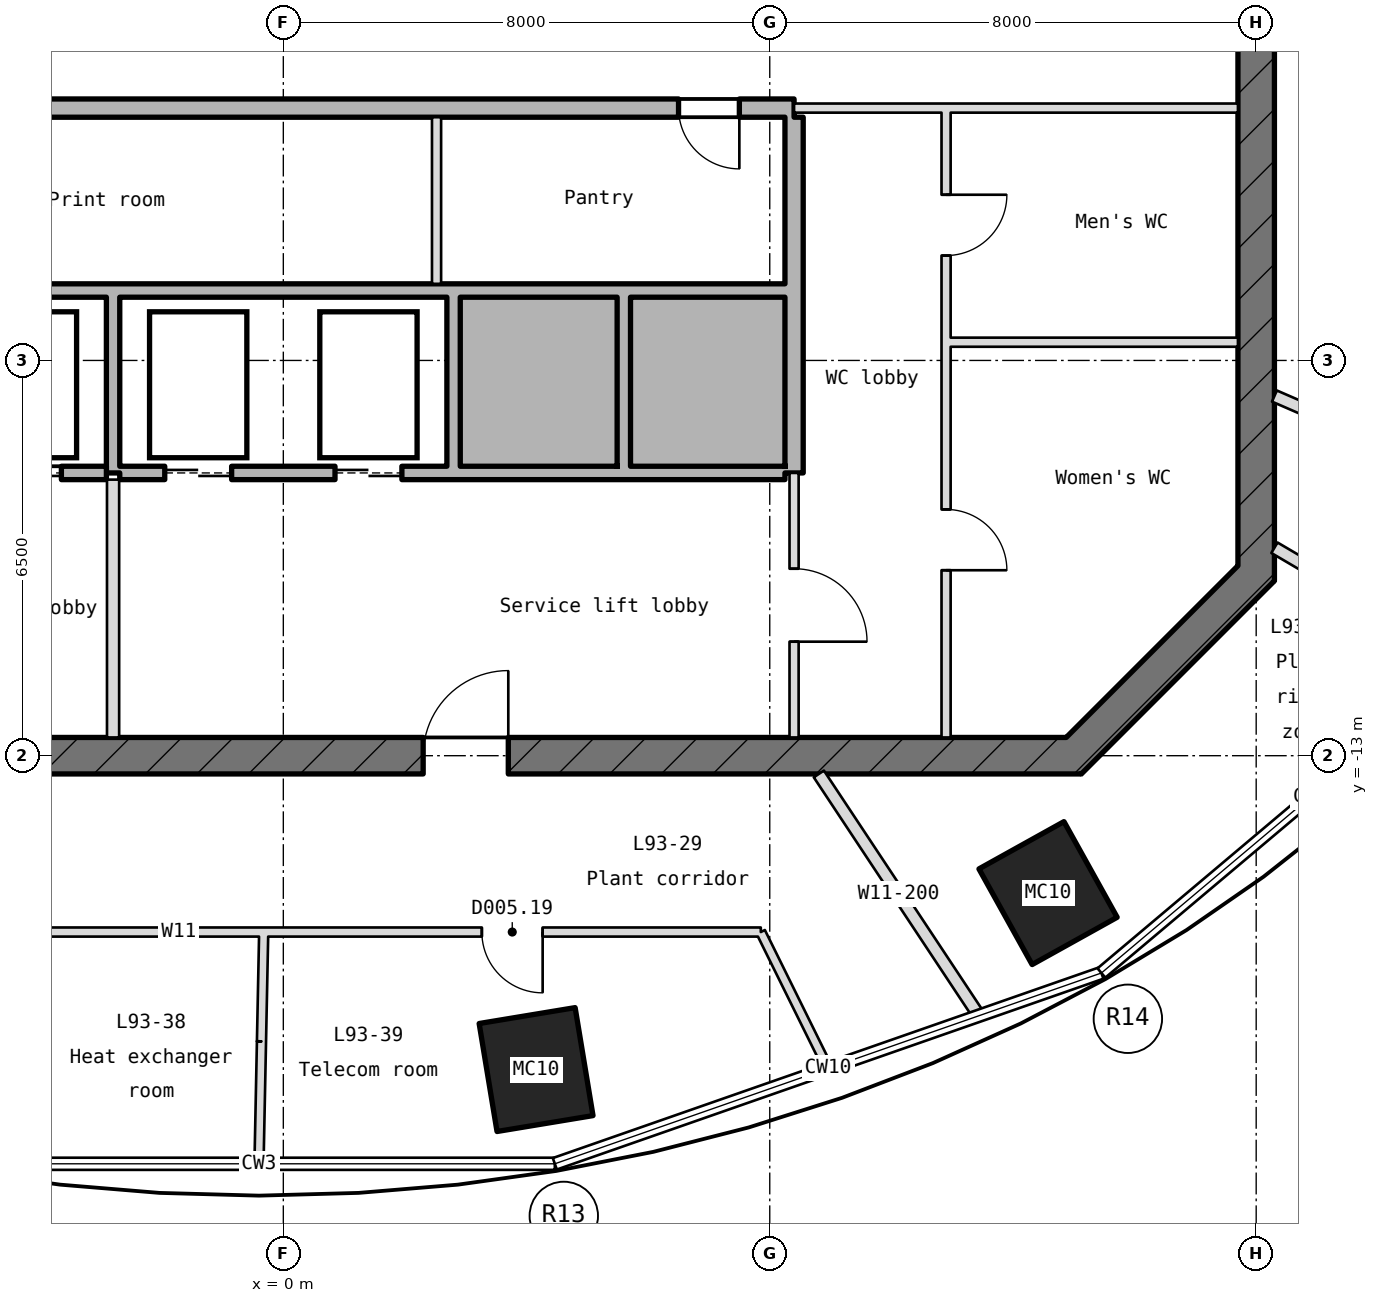
"""IFC4 building model, lengths in metres.
Left out: names, types, materials, properties, quantities, classifications, styles, units other than length and angle.
Written with IfcOpenShell. Run it as: python <this file> out.ifc"""

import sys

from ifc_helpers import new_model, si_unit, direction, frame, frame_2d, origin, origin_2d, place, context, subcontext, project, spatial, rectangle, hollow_rectangle, extrude, element, fill, save


model = new_model("IFC4")
c1 = context("Model", 3, precision=1e-05, world=origin(), true_north=direction((0.0, 1.0)))
c2 = subcontext(c1, "Body", "Model", "MODEL_VIEW")
j1 = project(units=[si_unit("LENGTHUNIT", "METRE"), si_unit("PLANEANGLEUNIT", "RADIAN")], contexts=[c1])
p1 = place(None, origin())
s1 = spatial("IfcSite", under=j1, at=p1, CompositionType="ELEMENT")
p2 = place(p1, origin())
s2 = spatial("IfcBuilding", under=s1, at=p2, CompositionType="ELEMENT")
p3 = place(p2, frame((0.0, 0.0, 413.55)))
s3 = spatial("IfcBuildingStorey", under=s2, at=p3, CompositionType="ELEMENT", Elevation=413.55)
for number, where, z_axis, x_axis in (
    (1, (4.157, -18.162, -0.2), (0.0, 0.0, 1.0), (-0.987, -0.163, 0.0)),
    (2, (12.577, -15.26, -0.2), (0.0, 0.0, 1.0), (-0.874, -0.486, 0.0)),
):
    element("IfcColumn", number, at=place(p3, frame(where, z_axis=z_axis, x_axis=x_axis)), inside=s3, PredefinedType="COLUMN", context=c2, shape_type="SweptSolid", body=[
        extrude(hollow_rectangle(XDim=1.6, YDim=1.8, WallThickness=0.045, at=origin_2d()), origin(), (0.0, 0.0, 1.0), 5.0),
    ])
p4 = place(p3, frame((12.912, -13.088, -0.2), z_axis=(0.0, 0.0, 1.0), x_axis=(0.707106781187, 0.707106781187, 0.0)))
e3 = element("IfcWall", 3, at=p4, inside=s3, PredefinedType="SHEAR", context=c2, shape_type="SweptSolid", body=[
    extrude(rectangle(XDim=4.491, YDim=0.6, at=frame_2d((2.246, 0.0))), origin(), (0.0, 0.0, 1.0), 5.0),
])
p5 = place(p3, frame((16.0, -10.124, -0.2), z_axis=(0.0, 0.0, 1.0), x_axis=(0.0, 1.0, 0.0)))
e4 = element("IfcWall", 4, at=p5, inside=s3, PredefinedType="SHEAR", context=c2, shape_type="SweptSolid", body=[
    extrude(rectangle(XDim=20.249, YDim=0.6, at=frame_2d((10.124, 0.0))), origin(), (0.0, 0.0, 1.0), 5.0),
])
p6 = place(p5, frame((8.924, 0.0, 0.2)))
e5 = element("IfcOpeningElement", 5, at=p6, cuts=e4, PredefinedType="OPENING", context=c2, shape_type="SweptSolid", body=[
    extrude(rectangle(XDim=2.4, YDim=2.1, at=frame_2d((1.2, 1.05))), frame((0.0, 0.31, 0.0), z_axis=(0.0, -1.0, 0.0), x_axis=(1.0, 0.0, 0.0)), (0.0, 0.0, 1.0), 0.62),
])
p7 = place(p5, frame((13.524, 0.0, 0.2)))
e6 = element("IfcOpeningElement", 6, at=p7, cuts=e4, PredefinedType="OPENING", context=c2, shape_type="SweptSolid", body=[
    extrude(rectangle(XDim=1.2, YDim=2.1, at=frame_2d((0.6, 1.05))), frame((0.0, 0.31, 0.0), z_axis=(0.0, -1.0, 0.0), x_axis=(1.0, 0.0, 0.0)), (0.0, 0.0, 1.0), 0.62),
])
p8 = place(p3, frame((-13.124, -13.0, -0.2), z_axis=(0.0, 0.0, 1.0), x_axis=(1.0, 0.0, 0.0)))
e7 = element("IfcWall", 7, at=p8, inside=s3, PredefinedType="SHEAR", context=c2, shape_type="SweptSolid", body=[
    extrude(rectangle(XDim=26.249, YDim=0.6, at=frame_2d((13.124, 0.0))), origin(), (0.0, 0.0, 1.0), 5.0),
])
p9 = place(p8, frame((2.824, 0.0, 0.2)))
e8 = element("IfcOpeningElement", 8, at=p9, cuts=e7, PredefinedType="OPENING", context=c2, shape_type="SweptSolid", body=[
    extrude(rectangle(XDim=1.2, YDim=2.1, at=frame_2d((0.6, 1.05))), frame((0.0, 0.31, 0.0), z_axis=(0.0, -1.0, 0.0), x_axis=(1.0, 0.0, 0.0)), (0.0, 0.0, 1.0), 0.62),
])
p10 = place(p8, frame((6.824, 0.0, 0.2)))
e9 = element("IfcOpeningElement", 9, at=p10, cuts=e7, PredefinedType="OPENING", context=c2, shape_type="SweptSolid", body=[
    extrude(rectangle(XDim=1.4, YDim=2.1, at=frame_2d((0.7, 1.05))), frame((0.0, 0.31, 0.0), z_axis=(0.0, -1.0, 0.0), x_axis=(1.0, 0.0, 0.0)), (0.0, 0.0, 1.0), 0.62),
])
p11 = place(p8, frame((15.424, 0.0, 0.2)))
e10 = element("IfcOpeningElement", 10, at=p11, cuts=e7, PredefinedType="OPENING", context=c2, shape_type="SweptSolid", body=[
    extrude(rectangle(XDim=1.4, YDim=2.1, at=frame_2d((0.7, 1.05))), frame((0.0, 0.31, 0.0), z_axis=(0.0, -1.0, 0.0), x_axis=(1.0, 0.0, 0.0)), (0.0, 0.0, 1.0), 0.62),
])
p12 = place(p3, frame((-8.25, -8.35, 0.0), z_axis=(0.0, 0.0, 1.0), x_axis=(1.0, 0.0, 0.0)))
e11 = element("IfcWall", 11, at=p12, inside=s3, PredefinedType="STANDARD", context=c2, shape_type="SweptSolid", body=[
    extrude(rectangle(XDim=5.34, YDim=0.22, at=frame_2d((2.67, 0.0))), origin(), (0.0, 0.0, 1.0), 4.8),
])
p13 = place(p12, frame((0.7, 0.0, 0.0)))
e12 = element("IfcOpeningElement", 12, at=p13, cuts=e11, PredefinedType="OPENING", context=c2, shape_type="SweptSolid", body=[
    extrude(rectangle(XDim=1.1, YDim=2.1, at=frame_2d((0.55, 1.05))), frame((0.0, 0.12, 0.0), z_axis=(0.0, -1.0, 0.0), x_axis=(1.0, 0.0, 0.0)), (0.0, 0.0, 1.0), 0.24),
])
p14 = place(p12, frame((3.5, 0.0, 0.0)))
e13 = element("IfcOpeningElement", 13, at=p14, cuts=e11, PredefinedType="OPENING", context=c2, shape_type="SweptSolid", body=[
    extrude(rectangle(XDim=1.1, YDim=2.1, at=frame_2d((0.55, 1.05))), frame((0.0, 0.12, 0.0), z_axis=(0.0, -1.0, 0.0), x_axis=(1.0, 0.0, 0.0)), (0.0, 0.0, 1.0), 0.24),
])
p15 = place(p3, frame((-2.69, -8.35, 0.0), z_axis=(0.0, 0.0, 1.0), x_axis=(1.0, 0.0, 0.0)))
e14 = element("IfcWall", 14, at=p15, inside=s3, PredefinedType="STANDARD", context=c2, shape_type="SweptSolid", body=[
    extrude(rectangle(XDim=10.94, YDim=0.22, at=frame_2d((5.47, 0.0))), origin(), (0.0, 0.0, 1.0), 4.8),
])
p16 = place(p15, frame((0.74, 0.0, 0.0)))
e15 = element("IfcOpeningElement", 15, at=p16, cuts=e14, PredefinedType="OPENING", context=c2, shape_type="SweptSolid", body=[
    extrude(rectangle(XDim=1.1, YDim=2.1, at=frame_2d((0.55, 1.05))), frame((0.0, 0.12, 0.0), z_axis=(0.0, -1.0, 0.0), x_axis=(1.0, 0.0, 0.0)), (0.0, 0.0, 1.0), 0.24),
])
p17 = place(p15, frame((3.54, 0.0, 0.0)))
e16 = element("IfcOpeningElement", 16, at=p17, cuts=e14, PredefinedType="OPENING", context=c2, shape_type="SweptSolid", body=[
    extrude(rectangle(XDim=1.1, YDim=2.1, at=frame_2d((0.55, 1.05))), frame((0.0, 0.12, 0.0), z_axis=(0.0, -1.0, 0.0), x_axis=(1.0, 0.0, 0.0)), (0.0, 0.0, 1.0), 0.24),
])
p18 = place(p3, frame((10.975, -6.2, 0.0), z_axis=(0.0, 0.0, 1.0), x_axis=(1.0, 0.0, 0.0)))
e17 = element("IfcWall", 17, at=p18, inside=s3, PredefinedType="PARTITIONING", context=c2, shape_type="SweptSolid", body=[
    extrude(rectangle(XDim=4.725, YDim=0.15, at=frame_2d((2.362, 0.0))), origin(), (0.0, 0.0, 1.0), 4.8),
])
p19 = place(p3, frame((-8.25, -5.35, 0.0), z_axis=(0.0, 0.0, 1.0), x_axis=(1.0, 0.0, 0.0)))
e18 = element("IfcWall", 18, at=p19, inside=s3, PredefinedType="STANDARD", context=c2, shape_type="SweptSolid", body=[
    extrude(rectangle(XDim=16.5, YDim=0.22, at=frame_2d((8.25, 0.0))), origin(), (0.0, 0.0, 1.0), 4.8),
])
p20 = place(p3, frame((-8.4, -2.35, -0.2), z_axis=(0.0, 0.0, 1.0), x_axis=(1.0, 0.0, 0.0)))
e19 = element("IfcWall", 19, at=p20, inside=s3, PredefinedType="SHEAR", context=c2, shape_type="SweptSolid", body=[
    extrude(rectangle(XDim=16.8, YDim=0.3, at=frame_2d((8.4, 0.0))), origin(), (0.0, 0.0, 1.0), 5.0),
])
p21 = place(p20, frame((0.9, 0.0, 0.2)))
e20 = element("IfcOpeningElement", 20, at=p21, cuts=e19, PredefinedType="OPENING", context=c2, shape_type="SweptSolid", body=[
    extrude(rectangle(XDim=1.0, YDim=2.1, at=frame_2d((0.5, 1.05))), frame((0.0, 0.16, 0.0), z_axis=(0.0, -1.0, 0.0), x_axis=(1.0, 0.0, 0.0)), (0.0, 0.0, 1.0), 0.32),
])
p22 = place(p20, frame((14.9, 0.0, 0.2)))
e21 = element("IfcOpeningElement", 21, at=p22, cuts=e19, PredefinedType="OPENING", context=c2, shape_type="SweptSolid", body=[
    extrude(rectangle(XDim=1.0, YDim=2.1, at=frame_2d((0.5, 1.05))), frame((0.0, 0.16, 0.0), z_axis=(0.0, -1.0, 0.0), x_axis=(1.0, 0.0, 0.0)), (0.0, 0.0, 1.0), 0.32),
])
p23 = place(p3, frame((8.4, -2.35, 0.0), z_axis=(0.0, 0.0, 1.0), x_axis=(1.0, 0.0, 0.0)))
e22 = element("IfcWall", 22, at=p23, inside=s3, PredefinedType="PARTITIONING", context=c2, shape_type="SweptSolid", body=[
    extrude(rectangle(XDim=7.3, YDim=0.15, at=frame_2d((3.65, 0.0))), origin(), (0.0, 0.0, 1.0), 4.8),
])
p24 = place(p3, frame((-2.8, -12.7, 0.0), z_axis=(0.0, 0.0, 1.0), x_axis=(0.0, 1.0, 0.0)))
e23 = element("IfcWall", 23, at=p24, inside=s3, PredefinedType="PARTITIONING", context=c2, shape_type="SweptSolid", body=[
    extrude(rectangle(XDim=4.24, YDim=0.2, at=frame_2d((2.12, 0.0))), origin(), (0.0, 0.0, 1.0), 4.8),
])
p25 = place(p3, frame((-2.8, -8.35, 0.0), z_axis=(0.0, 0.0, 1.0), x_axis=(0.0, 1.0, 0.0)))
e24 = element("IfcWall", 24, at=p25, inside=s3, PredefinedType="STANDARD", context=c2, shape_type="SweptSolid", body=[
    extrude(rectangle(XDim=2.89, YDim=0.22, at=frame_2d((1.445, 0.0))), origin(), (0.0, 0.0, 1.0), 4.8),
])
p26 = place(p3, frame((2.52, -5.24, 0.0), z_axis=(0.0, 0.0, 1.0), x_axis=(0.0, 1.0, 0.0)))
e25 = element("IfcWall", 25, at=p26, inside=s3, PredefinedType="PARTITIONING", context=c2, shape_type="SweptSolid", body=[
    extrude(rectangle(XDim=2.74, YDim=0.15, at=frame_2d((1.37, 0.0))), origin(), (0.0, 0.0, 1.0), 4.8),
])
for number, where, z_axis, x_axis in (
    (26, (2.8, -8.24, 0.0), (0.0, 0.0, 1.0), (0.0, 1.0, 0.0)),
    (27, (5.6, -8.24, 0.0), (0.0, 0.0, 1.0), (0.0, 1.0, 0.0)),
):
    element("IfcWall", number, at=place(p3, frame(where, z_axis=z_axis, x_axis=x_axis)), inside=s3, PredefinedType="STANDARD", context=c2, shape_type="SweptSolid", body=[
        extrude(rectangle(XDim=2.78, YDim=0.22, at=frame_2d((1.39, 0.0))), origin(), (0.0, 0.0, 1.0), 4.8),
    ])
p27 = place(p3, frame((8.4, -12.7, 0.0), z_axis=(0.0, 0.0, 1.0), x_axis=(0.0, 1.0, 0.0)))
e28 = element("IfcWall", 28, at=p27, inside=s3, PredefinedType="PARTITIONING", context=c2, shape_type="SweptSolid", body=[
    extrude(rectangle(XDim=4.35, YDim=0.15, at=frame_2d((2.175, 0.0))), origin(), (0.0, 0.0, 1.0), 4.8),
])
p28 = place(p27, frame((1.575, 0.0, 0.0)))
e29 = element("IfcOpeningElement", 29, at=p28, cuts=e28, PredefinedType="OPENING", context=c2, shape_type="SweptSolid", body=[
    extrude(rectangle(XDim=1.2, YDim=2.1, at=frame_2d((0.6, 1.05))), frame((0.0, 0.085, 0.0), z_axis=(0.0, -1.0, 0.0), x_axis=(1.0, 0.0, 0.0)), (0.0, 0.0, 1.0), 0.17),
])
p29 = place(p3, frame((8.4, -8.35, -0.2), z_axis=(0.0, 0.0, 1.0), x_axis=(0.0, 1.0, 0.0)))
e30 = element("IfcWall", 30, at=p29, inside=s3, PredefinedType="SHEAR", context=c2, shape_type="SweptSolid", body=[
    extrude(rectangle(XDim=5.85, YDim=0.3, at=frame_2d((2.925, 0.0))), origin(), (0.0, 0.0, 1.0), 5.0),
])
p30 = place(p3, frame((10.9, -12.7, 0.0), z_axis=(0.0, 0.0, 1.0), x_axis=(0.0, 1.0, 0.0)))
e31 = element("IfcWall", 31, at=p30, inside=s3, PredefinedType="PARTITIONING", context=c2, shape_type="SweptSolid", body=[
    extrude(rectangle(XDim=10.275, YDim=0.15, at=frame_2d((5.137, 0.0))), origin(), (0.0, 0.0, 1.0), 4.8),
])
p31 = place(p30, frame((7.925, 0.0, 0.0)))
e32 = element("IfcOpeningElement", 32, at=p31, cuts=e31, PredefinedType="OPENING", context=c2, shape_type="SweptSolid", body=[
    extrude(rectangle(XDim=1.0, YDim=2.1, at=frame_2d((0.5, 1.05))), frame((0.0, 0.085, 0.0), z_axis=(0.0, -1.0, 0.0), x_axis=(1.0, 0.0, 0.0)), (0.0, 0.0, 1.0), 0.17),
])
p32 = place(p30, frame((2.75, 0.0, 0.0)))
e33 = element("IfcOpeningElement", 33, at=p32, cuts=e31, PredefinedType="OPENING", context=c2, shape_type="SweptSolid", body=[
    extrude(rectangle(XDim=1.0, YDim=2.1, at=frame_2d((0.5, 1.05))), frame((0.0, 0.085, 0.0), z_axis=(0.0, -1.0, 0.0), x_axis=(1.0, 0.0, 0.0)), (0.0, 0.0, 1.0), 0.17),
])
p33 = place(p3, frame((-11.288, -15.9, 0.0), z_axis=(0.0, 0.0, 1.0), x_axis=(1.0, 0.0, 0.0)))
e34 = element("IfcWall", 34, at=p33, inside=s3, PredefinedType="PARTITIONING", context=c2, shape_type="SweptSolid", body=[
    extrude(rectangle(XDim=19.141, YDim=0.15, at=frame_2d((9.57, 0.0))), origin(), (0.0, 0.0, 1.0), 4.8),
])
p34 = place(p33, frame((4.98, 0.0, 0.0)))
e35 = element("IfcOpeningElement", 35, at=p34, cuts=e34, PredefinedType="OPENING", context=c2, shape_type="SweptSolid", body=[
    extrude(rectangle(XDim=1.0, YDim=2.1, at=frame_2d((0.5, 1.05))), frame((0.0, 0.085, 0.0), z_axis=(0.0, -1.0, 0.0), x_axis=(1.0, 0.0, 0.0)), (0.0, 0.0, 1.0), 0.17),
])
p35 = place(p33, frame((14.553, 0.0, 0.0)))
e36 = element("IfcOpeningElement", 36, at=p35, cuts=e34, PredefinedType="OPENING", context=c2, shape_type="SweptSolid", body=[
    extrude(rectangle(XDim=1.0, YDim=2.1, at=frame_2d((0.5, 1.05))), frame((0.0, 0.085, 0.0), z_axis=(0.0, -1.0, 0.0), x_axis=(1.0, 0.0, 0.0)), (0.0, 0.0, 1.0), 0.17),
])
p36 = place(p3, frame((-0.4, -19.691, 0.0), z_axis=(0.0, 0.0, 1.0), x_axis=(0.020323991195, 0.999793446359, 0.0)))
e37 = element("IfcWall", 37, at=p36, inside=s3, PredefinedType="PARTITIONING", context=c2, shape_type="SweptSolid", body=[
    extrude(rectangle(XDim=1.994, YDim=0.15, at=frame_2d((0.997, 0.0))), origin(), (0.0, 0.0, 1.0), 4.8),
])
p37 = place(p3, frame((-0.359, -17.698, 0.0), z_axis=(0.0, 0.0, 1.0), x_axis=(0.020232174519, 0.999795308608, 0.0)))
e38 = element("IfcWall", 38, at=p37, inside=s3, PredefinedType="PARTITIONING", context=c2, shape_type="SweptSolid", body=[
    extrude(rectangle(XDim=1.798, YDim=0.15, at=frame_2d((0.899, 0.0))), origin(), (0.0, 0.0, 1.0), 4.49),
])
p38 = place(p3, frame((8.951, -18.124, 0.0), z_axis=(0.0, 0.0, 1.0), x_axis=(-0.44283891536, 0.896601190632, 0.0)))
e39 = element("IfcWall", 39, at=p38, inside=s3, PredefinedType="PARTITIONING", context=c2, shape_type="SweptSolid", body=[
    extrude(rectangle(XDim=2.481, YDim=0.15, at=frame_2d((1.24, 0.0))), origin(), (0.0, 0.0, 1.0), 4.8),
])
p39 = place(p3, frame((11.429, -17.259, 0.0), z_axis=(0.0, 0.0, 1.0), x_axis=(-0.55212294176, 0.833762710357, 0.0)))
e40 = element("IfcWall", 40, at=p39, inside=s3, PredefinedType="PARTITIONING", context=c2, shape_type="SweptSolid", body=[
    extrude(rectangle(XDim=4.749, YDim=0.2, at=frame_2d((2.374, 0.0))), origin(), (0.0, 0.0, 1.0), 4.8),
])
p40 = place(p3, frame((18.899, -11.107, 0.0), z_axis=(0.0, 0.0, 1.0), x_axis=(-0.862138181782, 0.506673223601, 0.0)))
e41 = element("IfcWall", 41, at=p40, inside=s3, PredefinedType="PARTITIONING", context=c2, shape_type="SweptSolid", body=[
    extrude(rectangle(XDim=3.014, YDim=0.2, at=frame_2d((1.507, 0.0))), origin(), (0.0, 0.0, 1.0), 4.8),
])
p41 = place(p3, frame((18.9, -8.216, 0.0), z_axis=(0.0, 0.0, 1.0), x_axis=(-0.917070056253, 0.398726111414, 0.0)))
e42 = element("IfcWall", 42, at=p41, inside=s3, PredefinedType="PARTITIONING", context=c2, shape_type="SweptSolid", body=[
    extrude(rectangle(XDim=2.835, YDim=0.2, at=frame_2d((1.417, 0.0))), origin(), (0.0, 0.0, 1.0), 4.8),
])
p42 = place(p14, origin())
e43 = element("IfcDoor", 43, at=p42, inside=s3, OperationType="DOUBLE_DOOR_SLIDING", PredefinedType="DOOR", context=c2, shape_type="SweptSolid", body=[
    extrude(rectangle(XDim=1.1, YDim=2.1, at=frame_2d((0.55, 1.05))), frame((0.0, 0.025, 0.0), z_axis=(0.0, -1.0, 0.0), x_axis=(1.0, 0.0, 0.0)), (0.0, 0.0, 1.0), 0.05),
])
fill(e13, e43)
p43 = place(p16, origin())
e44 = element("IfcDoor", 44, at=p43, inside=s3, OperationType="DOUBLE_DOOR_SLIDING", PredefinedType="DOOR", context=c2, shape_type="SweptSolid", body=[
    extrude(rectangle(XDim=1.1, YDim=2.1, at=frame_2d((0.55, 1.05))), frame((0.0, 0.025, 0.0), z_axis=(0.0, -1.0, 0.0), x_axis=(1.0, 0.0, 0.0)), (0.0, 0.0, 1.0), 0.05),
])
fill(e15, e44)
p44 = place(p17, origin())
e45 = element("IfcDoor", 45, at=p44, inside=s3, OperationType="DOUBLE_DOOR_SLIDING", PredefinedType="DOOR", context=c2, shape_type="SweptSolid", body=[
    extrude(rectangle(XDim=1.1, YDim=2.1, at=frame_2d((0.55, 1.05))), frame((0.0, 0.025, 0.0), z_axis=(0.0, -1.0, 0.0), x_axis=(1.0, 0.0, 0.0)), (0.0, 0.0, 1.0), 0.05),
])
fill(e16, e45)
p45 = place(p11, origin())
e46 = element("IfcDoor", 46, at=p45, inside=s3, OperationType="SINGLE_SWING_RIGHT", PredefinedType="DOOR", context=c2, shape_type="SweptSolid", body=[
    extrude(rectangle(XDim=1.4, YDim=2.1, at=frame_2d((0.7, 1.05))), frame((0.0, 0.025, 0.0), z_axis=(0.0, -1.0, 0.0), x_axis=(1.0, 0.0, 0.0)), (0.0, 0.0, 1.0), 0.05),
])
fill(e10, e46)
p46 = place(p22, frame((1.0, 0.0, 0.0), z_axis=(0.0, 0.0, 1.0), x_axis=(-1.0, 0.0, 0.0)))
e47 = element("IfcDoor", 47, at=p46, inside=s3, OperationType="SINGLE_SWING_LEFT", PredefinedType="DOOR", context=c2, shape_type="SweptSolid", body=[
    extrude(rectangle(XDim=1.0, YDim=2.1, at=frame_2d((0.5, 1.05))), frame((0.0, 0.025, 0.0), z_axis=(0.0, -1.0, 0.0), x_axis=(1.0, 0.0, 0.0)), (0.0, 0.0, 1.0), 0.05),
])
fill(e21, e47)
p47 = place(p28, frame((1.2, 0.0, 0.0), z_axis=(0.0, 0.0, 1.0), x_axis=(-1.0, 0.0, 0.0)))
e48 = element("IfcDoor", 48, at=p47, inside=s3, OperationType="SINGLE_SWING_LEFT", PredefinedType="DOOR", context=c2, shape_type="SweptSolid", body=[
    extrude(rectangle(XDim=1.2, YDim=2.1, at=frame_2d((0.6, 1.05))), frame((0.0, 0.025, 0.0), z_axis=(0.0, -1.0, 0.0), x_axis=(1.0, 0.0, 0.0)), (0.0, 0.0, 1.0), 0.05),
])
fill(e29, e48)
p48 = place(p31, frame((1.0, 0.0, 0.0), z_axis=(0.0, 0.0, 1.0), x_axis=(-1.0, 0.0, 0.0)))
e49 = element("IfcDoor", 49, at=p48, inside=s3, OperationType="SINGLE_SWING_LEFT", PredefinedType="DOOR", context=c2, shape_type="SweptSolid", body=[
    extrude(rectangle(XDim=1.0, YDim=2.1, at=frame_2d((0.5, 1.05))), frame((0.0, 0.025, 0.0), z_axis=(0.0, -1.0, 0.0), x_axis=(1.0, 0.0, 0.0)), (0.0, 0.0, 1.0), 0.05),
])
fill(e32, e49)
p49 = place(p32, frame((1.0, 0.0, 0.0), z_axis=(0.0, 0.0, 1.0), x_axis=(-1.0, 0.0, 0.0)))
e50 = element("IfcDoor", 50, at=p49, inside=s3, OperationType="SINGLE_SWING_LEFT", PredefinedType="DOOR", context=c2, shape_type="SweptSolid", body=[
    extrude(rectangle(XDim=1.0, YDim=2.1, at=frame_2d((0.5, 1.05))), frame((0.0, 0.025, 0.0), z_axis=(0.0, -1.0, 0.0), x_axis=(1.0, 0.0, 0.0)), (0.0, 0.0, 1.0), 0.05),
])
fill(e33, e50)
p50 = place(p35, frame((1.0, 0.0, 0.0), z_axis=(0.0, 0.0, 1.0), x_axis=(-1.0, 0.0, 0.0)))
e51 = element("IfcDoor", 51, at=p50, inside=s3, OperationType="SINGLE_SWING_LEFT", PredefinedType="DOOR", context=c2, shape_type="SweptSolid", body=[
    extrude(rectangle(XDim=1.0, YDim=2.1, at=frame_2d((0.5, 1.05))), frame((0.0, 0.025, 0.0), z_axis=(0.0, -1.0, 0.0), x_axis=(1.0, 0.0, 0.0)), (0.0, 0.0, 1.0), 0.05),
])
fill(e36, e51)
save(model, sys.argv[1])
